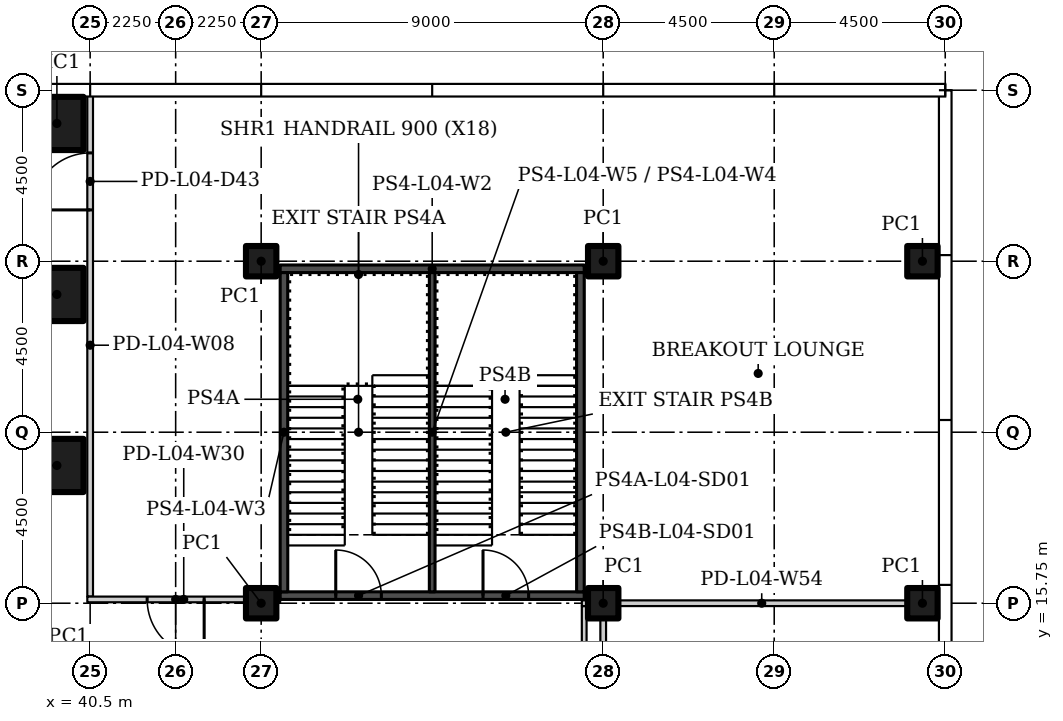
"""IFC4 building model, lengths in metres.
Left out: names, types, materials, properties, quantities, classifications, styles, units other than length and angle.
Written with IfcOpenShell. Run it as: python <this file> out.ifc"""

import sys

from ifc_helpers import new_model, si_unit, direction, frame, frame_2d, origin, origin_2d, place, context, subcontext, project, spatial, rectangle, hollow_rectangle, extrude, element, fill, save


model = new_model("IFC4")
c1 = context("Model", 3, precision=1e-05, world=origin(), true_north=direction((0.0, 1.0)))
c2 = subcontext(c1, "Body", "Model", "MODEL_VIEW")
j1 = project(units=[si_unit("LENGTHUNIT", "METRE"), si_unit("PLANEANGLEUNIT", "RADIAN")], contexts=[c1])
p1 = place(None, origin())
s1 = spatial("IfcSite", under=j1, at=p1, CompositionType="ELEMENT")
p2 = place(p1, origin())
s2 = spatial("IfcBuilding", under=s1, at=p2, CompositionType="ELEMENT")
p3 = place(p2, frame((0.0, 0.0, 23.5)))
s3 = spatial("IfcBuildingStorey", under=s2, at=p3, CompositionType="ELEMENT", Elevation=23.5)
for number, where in (
    (1, (39.625, 19.375, 0.0)),
    (2, (39.625, 23.875, 0.0)),
    (3, (39.625, 28.375, 0.0)),
):
    element("IfcColumn", number, at=place(p3, frame(where)), inside=s3, PredefinedType="COLUMN", context=c2, shape_type="SweptSolid", body=[
        extrude(hollow_rectangle(XDim=1.4, YDim=1.4, WallThickness=0.06, at=origin_2d()), origin(), (0.0, 0.0, 1.0), 4.65),
    ])
for number, where in (
    (4, (45.0, 15.75, 0.0)),
    (5, (45.0, 24.75, 0.0)),
    (6, (54.0, 15.75, 0.0)),
    (7, (54.0, 24.75, 0.0)),
    (8, (62.4, 15.75, 0.0)),
    (9, (62.4, 24.75, 0.0)),
):
    element("IfcColumn", number, at=place(p3, frame(where)), inside=s3, PredefinedType="COLUMN", context=c2, shape_type="SweptSolid", body=[
        extrude(hollow_rectangle(XDim=0.8, YDim=0.8, WallThickness=0.03, at=origin_2d()), origin(), (0.0, 0.0, 1.0), 4.65),
    ])
p4 = place(p3, frame((40.5, 15.925, 0.0), z_axis=(0.0, 0.0, 1.0), x_axis=(0.0, 1.0, 0.0)))
e10 = element("IfcWall", 10, at=p4, inside=s3, PredefinedType="PARTITIONING", context=c2, shape_type="SweptSolid", body=[
    extrude(rectangle(XDim=13.23, YDim=0.15, at=frame_2d((6.615, 0.0))), origin(), (0.0, 0.0, 1.0), 4.65),
])
p5 = place(p4, frame((10.175, 0.0, 0.0)))
e11 = element("IfcOpeningElement", 11, at=p5, cuts=e10, PredefinedType="OPENING", context=c2, shape_type="SweptSolid", body=[
    extrude(rectangle(XDim=1.5, YDim=2.1, at=frame_2d((0.75, 1.05))), frame((0.0, 0.085, 0.0), z_axis=(0.0, -1.0, 0.0), x_axis=(1.0, 0.0, 0.0)), (0.0, 0.0, 1.0), 0.17),
])
p6 = place(p3, frame((45.5, 15.85, 0.0), z_axis=(0.0, 0.0, 1.0), x_axis=(-1.0, 0.0, 0.0)))
e12 = element("IfcWall", 12, at=p6, inside=s3, PredefinedType="PARTITIONING", context=c2, shape_type="SweptSolid", body=[
    extrude(rectangle(XDim=5.075, YDim=0.15, at=frame_2d((2.538, 0.0))), origin(), (0.0, 0.0, 1.0), 4.65),
])
p7 = place(p6, frame((2.0, 0.0, 0.0)))
e13 = element("IfcOpeningElement", 13, at=p7, cuts=e12, PredefinedType="OPENING", context=c2, shape_type="SweptSolid", body=[
    extrude(rectangle(XDim=1.5, YDim=2.1, at=frame_2d((0.75, 1.05))), frame((0.0, 0.085, 0.0), z_axis=(0.0, -1.0, 0.0), x_axis=(1.0, 0.0, 0.0)), (0.0, 0.0, 1.0), 0.17),
])
p8 = place(p3, frame((53.5, 15.675, 0.0), z_axis=(0.0, 0.0, 1.0), x_axis=(0.0, -1.0, 0.0)))
e14 = element("IfcWall", 14, at=p8, inside=s3, PredefinedType="PARTITIONING", context=c2, shape_type="SweptSolid", body=[
    extrude(rectangle(XDim=2.763, YDim=0.125, at=frame_2d((1.381, 0.0))), origin(), (0.0, 0.0, 1.0), 4.65),
])
p9 = place(p3, frame((53.438, 15.75, 0.0)))
e15 = element("IfcWall", 15, at=p9, inside=s3, PredefinedType="PARTITIONING", context=c2, shape_type="SweptSolid", body=[
    extrude(rectangle(XDim=9.468, YDim=0.15, at=frame_2d((4.734, 0.0))), origin(), (0.0, 0.0, 1.0), 4.65),
])
p10 = place(p3, frame((54.0, 15.675, 0.0), z_axis=(0.0, 0.0, 1.0), x_axis=(0.0, -1.0, 0.0)))
e16 = element("IfcWall", 16, at=p10, inside=s3, PredefinedType="PARTITIONING", context=c2, shape_type="SweptSolid", body=[
    extrude(rectangle(XDim=8.85, YDim=0.15, at=frame_2d((4.425, 0.0))), origin(), (0.0, 0.0, 1.0), 4.65),
])
p11 = place(p3, frame((45.5, 15.95, 0.0)))
e17 = element("IfcWall", 17, at=p11, inside=s3, PredefinedType="SHEAR", context=c2, shape_type="SweptSolid", body=[
    extrude(rectangle(XDim=8.0, YDim=0.2, at=frame_2d((4.0, 0.0))), origin(), (0.0, 0.0, 1.0), 4.65),
])
p12 = place(p11, frame((1.462, 0.0, 0.0)))
e18 = element("IfcOpeningElement", 18, at=p12, cuts=e17, PredefinedType="OPENING", context=c2, shape_type="SweptSolid", body=[
    extrude(rectangle(XDim=1.2, YDim=2.4, at=frame_2d((0.6, 1.2))), frame((0.0, 0.11, 0.0), z_axis=(0.0, -1.0, 0.0), x_axis=(1.0, 0.0, 0.0)), (0.0, 0.0, 1.0), 0.22),
])
p13 = place(p11, frame((5.337, 0.0, 0.0)))
e19 = element("IfcOpeningElement", 19, at=p13, cuts=e17, PredefinedType="OPENING", context=c2, shape_type="SweptSolid", body=[
    extrude(rectangle(XDim=1.2, YDim=2.4, at=frame_2d((0.6, 1.2))), frame((0.0, 0.11, 0.0), z_axis=(0.0, -1.0, 0.0), x_axis=(1.0, 0.0, 0.0)), (0.0, 0.0, 1.0), 0.22),
])
p14 = place(p3, frame((45.5, 24.55, 0.0)))
e20 = element("IfcWall", 20, at=p14, inside=s3, PredefinedType="SHEAR", context=c2, shape_type="SweptSolid", body=[
    extrude(rectangle(XDim=8.0, YDim=0.2, at=frame_2d((4.0, 0.0))), origin(), (0.0, 0.0, 1.0), 4.65),
])
for number, where, z_axis, x_axis in (
    (21, (45.6, 16.05, 0.0), (0.0, 0.0, 1.0), (0.0, 1.0, 0.0)),
    (22, (53.4, 16.05, 0.0), (0.0, 0.0, 1.0), (0.0, 1.0, 0.0)),
):
    element("IfcWall", number, at=place(p3, frame(where, z_axis=z_axis, x_axis=x_axis)), inside=s3, PredefinedType="SHEAR", context=c2, shape_type="SweptSolid", body=[
        extrude(rectangle(XDim=8.4, YDim=0.2, at=frame_2d((4.2, 0.0))), origin(), (0.0, 0.0, 1.0), 4.65),
    ])
p15 = place(p3, frame((49.5, 16.05, 0.0), z_axis=(0.0, 0.0, 1.0), x_axis=(0.0, 1.0, 0.0)))
e23 = element("IfcWall", 23, at=p15, inside=s3, PredefinedType="SHEAR", context=c2, shape_type="SweptSolid", body=[
    extrude(rectangle(XDim=8.4, YDim=0.15, at=frame_2d((4.2, 0.0))), origin(), (0.0, 0.0, 1.0), 4.65),
])
p16 = place(p5, origin())
e24 = element("IfcDoor", 24, at=p16, inside=s3, OperationType="DOUBLE_DOOR_SINGLE_SWING", PredefinedType="DOOR", context=c2, shape_type="SweptSolid", body=[
    extrude(rectangle(XDim=1.5, YDim=2.1, at=frame_2d((0.75, 1.05))), frame((0.0, 0.025, 0.0), z_axis=(0.0, -1.0, 0.0), x_axis=(1.0, 0.0, 0.0)), (0.0, 0.0, 1.0), 0.05),
])
fill(e11, e24)
p17 = place(p7, origin())
e25 = element("IfcDoor", 25, at=p17, inside=s3, OperationType="DOUBLE_DOOR_SINGLE_SWING", PredefinedType="DOOR", context=c2, shape_type="SweptSolid", body=[
    extrude(rectangle(XDim=1.5, YDim=2.1, at=frame_2d((0.75, 1.05))), frame((0.0, 0.025, 0.0), z_axis=(0.0, -1.0, 0.0), x_axis=(1.0, 0.0, 0.0)), (0.0, 0.0, 1.0), 0.05),
])
fill(e13, e25)
p18 = place(p12, origin())
e26 = element("IfcDoor", 26, at=p18, inside=s3, OperationType="SINGLE_SWING_LEFT", PredefinedType="DOOR", context=c2, shape_type="SweptSolid", body=[
    extrude(rectangle(XDim=1.2, YDim=2.4, at=frame_2d((0.6, 1.2))), frame((0.0, 0.025, 0.0), z_axis=(0.0, -1.0, 0.0), x_axis=(1.0, 0.0, 0.0)), (0.0, 0.0, 1.0), 0.05),
])
fill(e18, e26)
p19 = place(p13, origin())
e27 = element("IfcDoor", 27, at=p19, inside=s3, OperationType="SINGLE_SWING_RIGHT", PredefinedType="DOOR", context=c2, shape_type="SweptSolid", body=[
    extrude(rectangle(XDim=1.2, YDim=2.4, at=frame_2d((0.6, 1.2))), frame((0.0, 0.025, 0.0), z_axis=(0.0, -1.0, 0.0), x_axis=(1.0, 0.0, 0.0)), (0.0, 0.0, 1.0), 0.05),
])
fill(e19, e27)
save(model, sys.argv[1])
